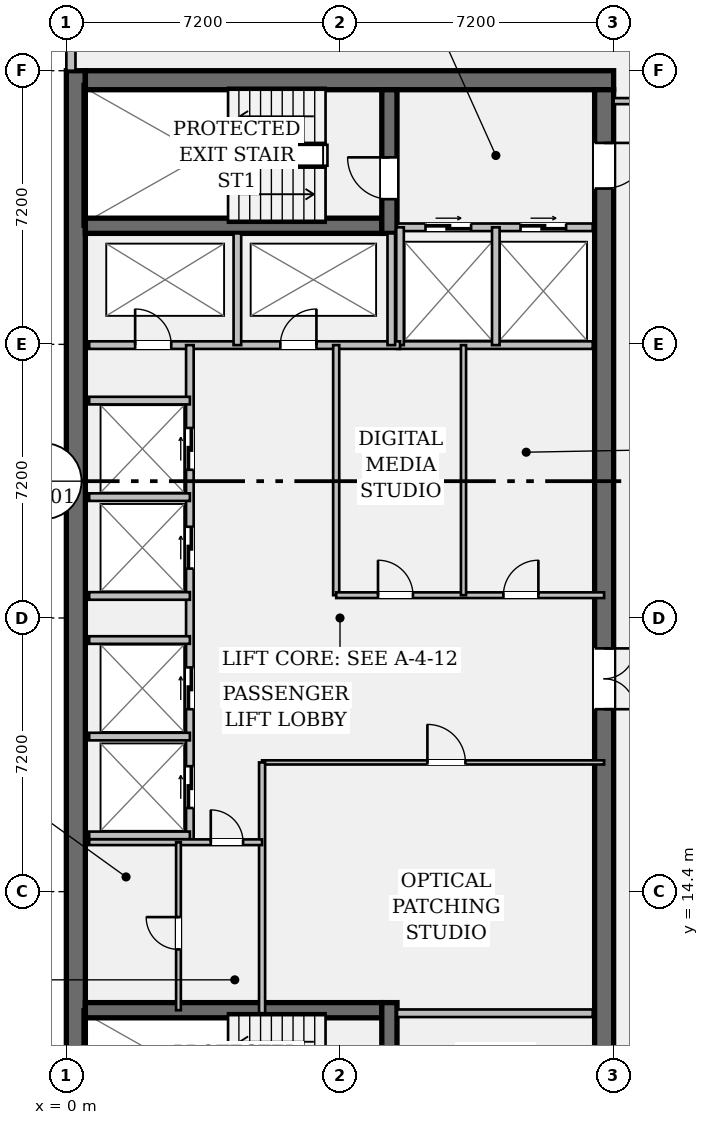
"""IFC4 building model, lengths in metres.
Left out: names, types, materials, properties, quantities, classifications, styles, units other than length and angle.
Written with IfcOpenShell. Run it as: python <this file> out.ifc"""

import sys

from ifc_helpers import new_model, si_unit, direction, frame, frame_2d, origin, place, context, subcontext, project, spatial, rectangle, extrude, element, fill, save


model = new_model("IFC4")
c1 = context("Model", 3, precision=1e-05, world=origin(), true_north=direction((0.0, 1.0)))
c2 = subcontext(c1, "Body", "Model", "MODEL_VIEW")
j1 = project(units=[si_unit("LENGTHUNIT", "METRE"), si_unit("PLANEANGLEUNIT", "RADIAN")], contexts=[c1])
p1 = place(None, origin())
s1 = spatial("IfcSite", under=j1, at=p1, CompositionType="ELEMENT")
p2 = place(p1, origin())
s2 = spatial("IfcBuilding", under=s1, at=p2, CompositionType="ELEMENT")
p3 = place(p2, frame((0.0, 0.0, 229.25)))
s3 = spatial("IfcBuildingStorey", under=s2, at=p3, CompositionType="ELEMENT", Elevation=229.25)
p4 = place(p3, frame((0.25, 7.2, 0.0), z_axis=(0.0, 0.0, 1.0), x_axis=(0.0, 1.0, 0.0)))
e1 = element("IfcWall", 1, at=p4, inside=s3, PredefinedType="SHEAR", context=c2, shape_type="SweptSolid", body=[
    extrude(rectangle(XDim=28.8, YDim=0.5, at=frame_2d((14.4, 0.0))), origin(), (0.0, 0.0, 1.0), 3.24),
])
p5 = place(p3, frame((0.5, 35.75, 0.0), z_axis=(0.0, 0.0, 1.0), x_axis=(1.0, 0.0, 0.0)))
e2 = element("IfcWall", 2, at=p5, inside=s3, PredefinedType="SHEAR", context=c2, shape_type="SweptSolid", body=[
    extrude(rectangle(XDim=13.9, YDim=0.5, at=frame_2d((6.95, 0.0))), origin(), (0.0, 0.0, 1.0), 3.24),
])
p6 = place(p3, frame((14.15, 35.5, 0.0), z_axis=(0.0, 0.0, 1.0), x_axis=(0.0, -1.0, 0.0)))
e3 = element("IfcWall", 3, at=p6, inside=s3, PredefinedType="SHEAR", context=c2, shape_type="SweptSolid", body=[
    extrude(rectangle(XDim=27.8, YDim=0.5, at=frame_2d((13.9, 0.0))), origin(), (0.0, 0.0, 1.0), 3.24),
])
p7 = place(p6, frame((1.4, 0.0, 0.0)))
e4 = element("IfcOpeningElement", 4, at=p7, cuts=e3, PredefinedType="OPENING", context=c2, shape_type="SweptSolid", body=[
    extrude(rectangle(XDim=1.2, YDim=2.15, at=frame_2d((0.6, 1.075))), frame((0.0, 0.262, 0.0), z_axis=(0.0, -1.0, 0.0), x_axis=(1.0, 0.0, 0.0)), (0.0, 0.0, 1.0), 0.524),
])
p8 = place(p6, frame((25.35, 0.0, 0.0)))
e5 = element("IfcOpeningElement", 5, at=p8, cuts=e3, PredefinedType="OPENING", context=c2, shape_type="SweptSolid", body=[
    extrude(rectangle(XDim=1.2, YDim=2.15, at=frame_2d((0.6, 1.075))), frame((0.0, 0.262, 0.0), z_axis=(0.0, -1.0, 0.0), x_axis=(1.0, 0.0, 0.0)), (0.0, 0.0, 1.0), 0.524),
])
p9 = place(p6, frame((14.7, 0.0, 0.0)))
e6 = element("IfcOpeningElement", 6, at=p9, cuts=e3, PredefinedType="OPENING", context=c2, shape_type="SweptSolid", body=[
    extrude(rectangle(XDim=1.6, YDim=2.2, at=frame_2d((0.8, 1.1))), frame((0.0, 0.262, 0.0), z_axis=(0.0, -1.0, 0.0), x_axis=(1.0, 0.0, 0.0)), (0.0, 0.0, 1.0), 0.524),
])
for number, where, z_axis, x_axis in (
    (7, (0.5, 31.92, 0.0), (0.0, 0.0, 1.0), (1.0, 0.0, 0.0)),
    (8, (0.5, 11.28, 0.0), (0.0, 0.0, 1.0), (1.0, 0.0, 0.0)),
):
    element("IfcWall", number, at=place(p3, frame(where, z_axis=z_axis, x_axis=x_axis)), inside=s3, PredefinedType="SHEAR", context=c2, shape_type="SweptSolid", body=[
        extrude(rectangle(XDim=7.8, YDim=0.4, at=frame_2d((3.9, 0.0))), origin(), (0.0, 0.0, 1.0), 3.24),
    ])
p10 = place(p3, frame((8.5, 31.72, 0.0), z_axis=(0.0, 0.0, 1.0), x_axis=(0.0, 1.0, 0.0)))
e9 = element("IfcWall", 9, at=p10, inside=s3, PredefinedType="SHEAR", context=c2, shape_type="SweptSolid", body=[
    extrude(rectangle(XDim=3.78, YDim=0.4, at=frame_2d((1.89, 0.0))), origin(), (0.0, 0.0, 1.0), 3.24),
])
p11 = place(p10, frame((0.9, 0.0, 0.0)))
e10 = element("IfcOpeningElement", 10, at=p11, cuts=e9, PredefinedType="OPENING", context=c2, shape_type="SweptSolid", body=[
    extrude(rectangle(XDim=1.1, YDim=2.15, at=frame_2d((0.55, 1.075))), frame((0.0, 0.212, 0.0), z_axis=(0.0, -1.0, 0.0), x_axis=(1.0, 0.0, 0.0)), (0.0, 0.0, 1.0), 0.424),
])
p12 = place(p3, frame((8.5, 7.7, 0.0), z_axis=(0.0, 0.0, 1.0), x_axis=(0.0, 1.0, 0.0)))
e11 = element("IfcWall", 11, at=p12, inside=s3, PredefinedType="SHEAR", context=c2, shape_type="SweptSolid", body=[
    extrude(rectangle(XDim=3.78, YDim=0.4, at=frame_2d((1.89, 0.0))), origin(), (0.0, 0.0, 1.0), 3.24),
])
p13 = place(p12, frame((0.85, 0.0, 0.0)))
e12 = element("IfcOpeningElement", 12, at=p13, cuts=e11, PredefinedType="OPENING", context=c2, shape_type="SweptSolid", body=[
    extrude(rectangle(XDim=1.1, YDim=2.15, at=frame_2d((0.55, 1.075))), frame((0.0, 0.212, 0.0), z_axis=(0.0, -1.0, 0.0), x_axis=(1.0, 0.0, 0.0)), (0.0, 0.0, 1.0), 0.424),
])
p14 = place(p3, frame((0.12, 36.0, 0.0), z_axis=(0.0, 0.0, 1.0), x_axis=(0.0, 1.0, 0.0)))
e13 = element("IfcWall", 13, at=p14, inside=s3, PredefinedType="STANDARD", context=c2, shape_type="SweptSolid", body=[
    extrude(rectangle(XDim=1.17, YDim=0.24, at=frame_2d((0.585, 0.0))), origin(), (0.0, 0.0, 1.0), 3.24),
])
p15 = place(p3, frame((8.7, 31.88, 0.0), z_axis=(0.0, 0.0, 1.0), x_axis=(1.0, 0.0, 0.0)))
e14 = element("IfcWall", 14, at=p15, inside=s3, PredefinedType="PARTITIONING", context=c2, shape_type="SweptSolid", body=[
    extrude(rectangle(XDim=5.15, YDim=0.2, at=frame_2d((2.575, 0.0))), origin(), (0.0, 0.0, 1.0), 3.24),
])
p16 = place(p15, frame((0.75, 0.0, 0.0)))
e15 = element("IfcOpeningElement", 15, at=p16, cuts=e14, PredefinedType="OPENING", context=c2, shape_type="SweptSolid", body=[
    extrude(rectangle(XDim=1.2, YDim=2.2, at=frame_2d((0.6, 1.1))), frame((0.0, 0.112, 0.0), z_axis=(0.0, -1.0, 0.0), x_axis=(1.0, 0.0, 0.0)), (0.0, 0.0, 1.0), 0.224),
])
p17 = place(p15, frame((3.25, 0.0, 0.0)))
e16 = element("IfcOpeningElement", 16, at=p17, cuts=e14, PredefinedType="OPENING", context=c2, shape_type="SweptSolid", body=[
    extrude(rectangle(XDim=1.2, YDim=2.2, at=frame_2d((0.6, 1.1))), frame((0.0, 0.112, 0.0), z_axis=(0.0, -1.0, 0.0), x_axis=(1.0, 0.0, 0.0)), (0.0, 0.0, 1.0), 0.224),
])
for number, where, z_axis, x_axis in (
    (17, (8.7, 11.2, 0.0), (0.0, 0.0, 1.0), (1.0, 0.0, 0.0)),
    (18, (8.7, 28.78, 0.0), (0.0, 0.0, 1.0), (1.0, 0.0, 0.0)),
):
    element("IfcWall", number, at=place(p3, frame(where, z_axis=z_axis, x_axis=x_axis)), inside=s3, PredefinedType="PARTITIONING", context=c2, shape_type="SweptSolid", body=[
        extrude(rectangle(XDim=5.15, YDim=0.2, at=frame_2d((2.575, 0.0))), origin(), (0.0, 0.0, 1.0), 3.24),
    ])
for number, where, z_axis, x_axis in (
    (19, (8.78, 28.78, 0.0), (0.0, 0.0, 1.0), (0.0, 1.0, 0.0)),
    (20, (11.3, 28.78, 0.0), (0.0, 0.0, 1.0), (0.0, 1.0, 0.0)),
):
    element("IfcWall", number, at=place(p3, frame(where, z_axis=z_axis, x_axis=x_axis)), inside=s3, PredefinedType="PARTITIONING", context=c2, shape_type="SweptSolid", body=[
        extrude(rectangle(XDim=3.1, YDim=0.2, at=frame_2d((1.55, 0.0))), origin(), (0.0, 0.0, 1.0), 3.24),
    ])
p18 = place(p3, frame((0.6, 28.78, 0.0), z_axis=(0.0, 0.0, 1.0), x_axis=(1.0, 0.0, 0.0)))
e21 = element("IfcWall", 21, at=p18, inside=s3, PredefinedType="PARTITIONING", context=c2, shape_type="SweptSolid", body=[
    extrude(rectangle(XDim=8.18, YDim=0.2, at=frame_2d((4.09, 0.0))), origin(), (0.0, 0.0, 1.0), 3.24),
])
p19 = place(p18, frame((1.21, 0.0, 0.0)))
e22 = element("IfcOpeningElement", 22, at=p19, cuts=e21, PredefinedType="OPENING", context=c2, shape_type="SweptSolid", body=[
    extrude(rectangle(XDim=0.95, YDim=2.15, at=frame_2d((0.475, 1.075))), frame((0.0, 0.112, 0.0), z_axis=(0.0, -1.0, 0.0), x_axis=(1.0, 0.0, 0.0)), (0.0, 0.0, 1.0), 0.224),
])
p20 = place(p18, frame((5.03, 0.0, 0.0)))
e23 = element("IfcOpeningElement", 23, at=p20, cuts=e21, PredefinedType="OPENING", context=c2, shape_type="SweptSolid", body=[
    extrude(rectangle(XDim=0.95, YDim=2.15, at=frame_2d((0.475, 1.075))), frame((0.0, 0.112, 0.0), z_axis=(0.0, -1.0, 0.0), x_axis=(1.0, 0.0, 0.0)), (0.0, 0.0, 1.0), 0.224),
])
for number, where, z_axis, x_axis in (
    (24, (4.5, 28.78, 0.0), (0.0, 0.0, 1.0), (0.0, 1.0, 0.0)),
    (25, (8.55, 28.78, 0.0), (0.0, 0.0, 1.0), (0.0, 1.0, 0.0)),
):
    element("IfcWall", number, at=place(p3, frame(where, z_axis=z_axis, x_axis=x_axis)), inside=s3, PredefinedType="PARTITIONING", context=c2, shape_type="SweptSolid", body=[
        extrude(rectangle(XDim=2.94, YDim=0.2, at=frame_2d((1.47, 0.0))), origin(), (0.0, 0.0, 1.0), 3.24),
    ])
p21 = place(p3, frame((3.25, 15.7, 0.0), z_axis=(0.0, 0.0, 1.0), x_axis=(0.0, 1.0, 0.0)))
e26 = element("IfcWall", 26, at=p21, inside=s3, PredefinedType="PARTITIONING", context=c2, shape_type="SweptSolid", body=[
    extrude(rectangle(XDim=13.08, YDim=0.2, at=frame_2d((6.54, 0.0))), origin(), (0.0, 0.0, 1.0), 3.24),
])
p22 = place(p21, frame((0.9, 0.0, 0.0)))
e27 = element("IfcOpeningElement", 27, at=p22, cuts=e26, PredefinedType="OPENING", context=c2, shape_type="SweptSolid", body=[
    extrude(rectangle(XDim=1.1, YDim=2.2, at=frame_2d((0.55, 1.1))), frame((0.0, 0.112, 0.0), z_axis=(0.0, -1.0, 0.0), x_axis=(1.0, 0.0, 0.0)), (0.0, 0.0, 1.0), 0.224),
])
p23 = place(p21, frame((3.5, 0.0, 0.0)))
e28 = element("IfcOpeningElement", 28, at=p23, cuts=e26, PredefinedType="OPENING", context=c2, shape_type="SweptSolid", body=[
    extrude(rectangle(XDim=1.1, YDim=2.2, at=frame_2d((0.55, 1.1))), frame((0.0, 0.112, 0.0), z_axis=(0.0, -1.0, 0.0), x_axis=(1.0, 0.0, 0.0)), (0.0, 0.0, 1.0), 0.224),
])
p24 = place(p21, frame((7.2, 0.0, 0.0)))
e29 = element("IfcOpeningElement", 29, at=p24, cuts=e26, PredefinedType="OPENING", context=c2, shape_type="SweptSolid", body=[
    extrude(rectangle(XDim=1.1, YDim=2.2, at=frame_2d((0.55, 1.1))), frame((0.0, 0.112, 0.0), z_axis=(0.0, -1.0, 0.0), x_axis=(1.0, 0.0, 0.0)), (0.0, 0.0, 1.0), 0.224),
])
p25 = place(p21, frame((9.8, 0.0, 0.0)))
e30 = element("IfcOpeningElement", 30, at=p25, cuts=e26, PredefinedType="OPENING", context=c2, shape_type="SweptSolid", body=[
    extrude(rectangle(XDim=1.1, YDim=2.2, at=frame_2d((0.55, 1.1))), frame((0.0, 0.112, 0.0), z_axis=(0.0, -1.0, 0.0), x_axis=(1.0, 0.0, 0.0)), (0.0, 0.0, 1.0), 0.224),
])
for number, where, z_axis, x_axis in (
    (31, (0.6, 15.88, 0.0), (0.0, 0.0, 1.0), (1.0, 0.0, 0.0)),
    (32, (0.6, 18.48, 0.0), (0.0, 0.0, 1.0), (1.0, 0.0, 0.0)),
    (33, (0.6, 22.18, 0.0), (0.0, 0.0, 1.0), (1.0, 0.0, 0.0)),
    (34, (0.6, 24.78, 0.0), (0.0, 0.0, 1.0), (1.0, 0.0, 0.0)),
    (35, (0.6, 21.02, 0.0), (0.0, 0.0, 1.0), (1.0, 0.0, 0.0)),
    (36, (0.6, 27.32, 0.0), (0.0, 0.0, 1.0), (1.0, 0.0, 0.0)),
):
    element("IfcWall", number, at=place(p3, frame(where, z_axis=z_axis, x_axis=x_axis)), inside=s3, PredefinedType="PARTITIONING", context=c2, shape_type="SweptSolid", body=[
        extrude(rectangle(XDim=2.65, YDim=0.2, at=frame_2d((1.325, 0.0))), origin(), (0.0, 0.0, 1.0), 3.24),
    ])
p26 = place(p3, frame((7.1, 22.2, 0.0), z_axis=(0.0, 0.0, 1.0), x_axis=(0.0, 1.0, 0.0)))
e37 = element("IfcWall", 37, at=p26, inside=s3, PredefinedType="PARTITIONING", context=c2, shape_type="SweptSolid", body=[
    extrude(rectangle(XDim=6.58, YDim=0.16, at=frame_2d((3.29, 0.0))), origin(), (0.0, 0.0, 1.0), 3.24),
])
p27 = place(p3, frame((7.1, 22.2, 0.0), z_axis=(0.0, 0.0, 1.0), x_axis=(1.0, 0.0, 0.0)))
e38 = element("IfcWall", 38, at=p27, inside=s3, PredefinedType="PARTITIONING", context=c2, shape_type="SweptSolid", body=[
    extrude(rectangle(XDim=7.05, YDim=0.15, at=frame_2d((3.525, 0.0))), origin(), (0.0, 0.0, 1.0), 3.24),
])
p28 = place(p27, frame((1.1, 0.0, 0.0)))
e39 = element("IfcOpeningElement", 39, at=p28, cuts=e38, PredefinedType="OPENING", context=c2, shape_type="SweptSolid", body=[
    extrude(rectangle(XDim=0.92, YDim=2.15, at=frame_2d((0.46, 1.075))), frame((0.0, 0.087, 0.0), z_axis=(0.0, -1.0, 0.0), x_axis=(1.0, 0.0, 0.0)), (0.0, 0.0, 1.0), 0.174),
])
p29 = place(p27, frame((4.4, 0.0, 0.0)))
e40 = element("IfcOpeningElement", 40, at=p29, cuts=e38, PredefinedType="OPENING", context=c2, shape_type="SweptSolid", body=[
    extrude(rectangle(XDim=0.92, YDim=2.15, at=frame_2d((0.46, 1.075))), frame((0.0, 0.087, 0.0), z_axis=(0.0, -1.0, 0.0), x_axis=(1.0, 0.0, 0.0)), (0.0, 0.0, 1.0), 0.174),
])
p30 = place(p3, frame((10.45, 22.2, 0.0), z_axis=(0.0, 0.0, 1.0), x_axis=(0.0, 1.0, 0.0)))
e41 = element("IfcWall", 41, at=p30, inside=s3, PredefinedType="PARTITIONING", context=c2, shape_type="SweptSolid", body=[
    extrude(rectangle(XDim=6.58, YDim=0.135, at=frame_2d((3.29, 0.0))), origin(), (0.0, 0.0, 1.0), 3.24),
])
p31 = place(p3, frame((5.15, 17.8, 0.0), z_axis=(0.0, 0.0, 1.0), x_axis=(1.0, 0.0, 0.0)))
e42 = element("IfcWall", 42, at=p31, inside=s3, PredefinedType="PARTITIONING", context=c2, shape_type="SweptSolid", body=[
    extrude(rectangle(XDim=9.0, YDim=0.11, at=frame_2d((4.5, 0.0))), origin(), (0.0, 0.0, 1.0), 3.24),
])
p32 = place(p31, frame((4.35, 0.0, 0.0)))
e43 = element("IfcOpeningElement", 43, at=p32, cuts=e42, PredefinedType="OPENING", context=c2, shape_type="SweptSolid", body=[
    extrude(rectangle(XDim=1.0, YDim=2.15, at=frame_2d((0.5, 1.075))), frame((0.0, 0.067, 0.0), z_axis=(0.0, -1.0, 0.0), x_axis=(1.0, 0.0, 0.0)), (0.0, 0.0, 1.0), 0.134),
])
p33 = place(p3, frame((5.15, 11.2, 0.0), z_axis=(0.0, 0.0, 1.0), x_axis=(0.0, 1.0, 0.0)))
e44 = element("IfcWall", 44, at=p33, inside=s3, PredefinedType="PARTITIONING", context=c2, shape_type="SweptSolid", body=[
    extrude(rectangle(XDim=6.6, YDim=0.16, at=frame_2d((3.3, 0.0))), origin(), (0.0, 0.0, 1.0), 3.24),
])
p34 = place(p3, frame((0.6, 15.7, 0.0), z_axis=(0.0, 0.0, 1.0), x_axis=(1.0, 0.0, 0.0)))
e45 = element("IfcWall", 45, at=p34, inside=s3, PredefinedType="PARTITIONING", context=c2, shape_type="SweptSolid", body=[
    extrude(rectangle(XDim=4.55, YDim=0.15, at=frame_2d((2.275, 0.0))), origin(), (0.0, 0.0, 1.0), 3.24),
])
p35 = place(p34, frame((3.2, 0.0, 0.0)))
e46 = element("IfcOpeningElement", 46, at=p35, cuts=e45, PredefinedType="OPENING", context=c2, shape_type="SweptSolid", body=[
    extrude(rectangle(XDim=0.85, YDim=2.15, at=frame_2d((0.425, 1.075))), frame((0.0, 0.087, 0.0), z_axis=(0.0, -1.0, 0.0), x_axis=(1.0, 0.0, 0.0)), (0.0, 0.0, 1.0), 0.174),
])
p36 = place(p3, frame((2.95, 11.28, 0.0), z_axis=(0.0, 0.0, 1.0), x_axis=(0.0, 1.0, 0.0)))
e47 = element("IfcWall", 47, at=p36, inside=s3, PredefinedType="PARTITIONING", context=c2, shape_type="SweptSolid", body=[
    extrude(rectangle(XDim=4.42, YDim=0.125, at=frame_2d((2.21, 0.0))), origin(), (0.0, 0.0, 1.0), 3.24),
])
p37 = place(p36, frame((1.6, 0.0, 0.0)))
e48 = element("IfcOpeningElement", 48, at=p37, cuts=e47, PredefinedType="OPENING", context=c2, shape_type="SweptSolid", body=[
    extrude(rectangle(XDim=0.85, YDim=2.15, at=frame_2d((0.425, 1.075))), frame((0.0, 0.074, 0.0), z_axis=(0.0, -1.0, 0.0), x_axis=(1.0, 0.0, 0.0)), (0.0, 0.0, 1.0), 0.149),
])
p38 = place(p3, frame((14.4, 35.2, 0.0), z_axis=(0.0, 0.0, 1.0), x_axis=(1.0, 0.0, 0.0)))
e49 = element("IfcWall", 49, at=p38, inside=s3, PredefinedType="PARTITIONING", context=c2, shape_type="SweptSolid", body=[
    extrude(rectangle(XDim=2.95, YDim=0.16, at=frame_2d((1.475, 0.0))), origin(), (0.0, 0.0, 1.0), 2.808),
])
p39 = place(p38, frame((0.95, 0.0, 0.0)))
e50 = element("IfcOpeningElement", 50, at=p39, cuts=e49, PredefinedType="OPENING", context=c2, shape_type="SweptSolid", body=[
    extrude(rectangle(XDim=1.0, YDim=2.15, at=frame_2d((0.5, 1.075))), frame((0.0, 0.092, 0.0), z_axis=(0.0, -1.0, 0.0), x_axis=(1.0, 0.0, 0.0)), (0.0, 0.0, 1.0), 0.184),
])
p40 = place(p11, origin())
e51 = element("IfcDoor", 51, at=p40, inside=s3, OperationType="SINGLE_SWING_RIGHT", PredefinedType="DOOR", context=c2, shape_type="SweptSolid", body=[
    extrude(rectangle(XDim=1.1, YDim=2.15, at=frame_2d((0.55, 1.075))), frame((0.0, 0.025, 0.0), z_axis=(0.0, -1.0, 0.0), x_axis=(1.0, 0.0, 0.0)), (0.0, 0.0, 1.0), 0.05),
])
fill(e10, e51)
p41 = place(p7, origin())
e52 = element("IfcDoor", 52, at=p41, inside=s3, OperationType="SINGLE_SWING_LEFT", PredefinedType="DOOR", context=c2, shape_type="SweptSolid", body=[
    extrude(rectangle(XDim=1.2, YDim=2.15, at=frame_2d((0.6, 1.075))), frame((0.0, 0.025, 0.0), z_axis=(0.0, -1.0, 0.0), x_axis=(1.0, 0.0, 0.0)), (0.0, 0.0, 1.0), 0.05),
])
fill(e4, e52)
p42 = place(p16, origin())
e53 = element("IfcDoor", 53, at=p42, inside=s3, OperationType="DOUBLE_DOOR_SLIDING", PredefinedType="DOOR", context=c2, shape_type="SweptSolid", body=[
    extrude(rectangle(XDim=1.2, YDim=2.2, at=frame_2d((0.6, 1.1))), frame((0.0, 0.025, 0.0), z_axis=(0.0, -1.0, 0.0), x_axis=(1.0, 0.0, 0.0)), (0.0, 0.0, 1.0), 0.05),
])
fill(e15, e53)
p43 = place(p17, origin())
e54 = element("IfcDoor", 54, at=p43, inside=s3, OperationType="DOUBLE_DOOR_SLIDING", PredefinedType="DOOR", context=c2, shape_type="SweptSolid", body=[
    extrude(rectangle(XDim=1.2, YDim=2.2, at=frame_2d((0.6, 1.1))), frame((0.0, 0.025, 0.0), z_axis=(0.0, -1.0, 0.0), x_axis=(1.0, 0.0, 0.0)), (0.0, 0.0, 1.0), 0.05),
])
fill(e16, e54)
p44 = place(p19, origin())
e55 = element("IfcDoor", 55, at=p44, inside=s3, OperationType="SINGLE_SWING_LEFT", PredefinedType="DOOR", context=c2, shape_type="SweptSolid", body=[
    extrude(rectangle(XDim=0.95, YDim=2.15, at=frame_2d((0.475, 1.075))), frame((0.0, 0.025, 0.0), z_axis=(0.0, -1.0, 0.0), x_axis=(1.0, 0.0, 0.0)), (0.0, 0.0, 1.0), 0.05),
])
fill(e22, e55)
p45 = place(p20, origin())
e56 = element("IfcDoor", 56, at=p45, inside=s3, OperationType="SINGLE_SWING_RIGHT", PredefinedType="DOOR", context=c2, shape_type="SweptSolid", body=[
    extrude(rectangle(XDim=0.95, YDim=2.15, at=frame_2d((0.475, 1.075))), frame((0.0, 0.025, 0.0), z_axis=(0.0, -1.0, 0.0), x_axis=(1.0, 0.0, 0.0)), (0.0, 0.0, 1.0), 0.05),
])
fill(e23, e56)
p46 = place(p9, origin())
e57 = element("IfcDoor", 57, at=p46, inside=s3, OperationType="DOUBLE_DOOR_SINGLE_SWING", PredefinedType="DOOR", context=c2, shape_type="SweptSolid", body=[
    extrude(rectangle(XDim=1.6, YDim=2.2, at=frame_2d((0.8, 1.1))), frame((0.0, 0.025, 0.0), z_axis=(0.0, -1.0, 0.0), x_axis=(1.0, 0.0, 0.0)), (0.0, 0.0, 1.0), 0.05),
])
fill(e6, e57)
p47 = place(p22, origin())
e58 = element("IfcDoor", 58, at=p47, inside=s3, OperationType="DOUBLE_DOOR_SLIDING", PredefinedType="DOOR", context=c2, shape_type="SweptSolid", body=[
    extrude(rectangle(XDim=1.1, YDim=2.2, at=frame_2d((0.55, 1.1))), frame((0.0, 0.025, 0.0), z_axis=(0.0, -1.0, 0.0), x_axis=(1.0, 0.0, 0.0)), (0.0, 0.0, 1.0), 0.05),
])
fill(e27, e58)
p48 = place(p23, origin())
e59 = element("IfcDoor", 59, at=p48, inside=s3, OperationType="DOUBLE_DOOR_SLIDING", PredefinedType="DOOR", context=c2, shape_type="SweptSolid", body=[
    extrude(rectangle(XDim=1.1, YDim=2.2, at=frame_2d((0.55, 1.1))), frame((0.0, 0.025, 0.0), z_axis=(0.0, -1.0, 0.0), x_axis=(1.0, 0.0, 0.0)), (0.0, 0.0, 1.0), 0.05),
])
fill(e28, e59)
p49 = place(p24, origin())
e60 = element("IfcDoor", 60, at=p49, inside=s3, OperationType="DOUBLE_DOOR_SLIDING", PredefinedType="DOOR", context=c2, shape_type="SweptSolid", body=[
    extrude(rectangle(XDim=1.1, YDim=2.2, at=frame_2d((0.55, 1.1))), frame((0.0, 0.025, 0.0), z_axis=(0.0, -1.0, 0.0), x_axis=(1.0, 0.0, 0.0)), (0.0, 0.0, 1.0), 0.05),
])
fill(e29, e60)
p50 = place(p25, origin())
e61 = element("IfcDoor", 61, at=p50, inside=s3, OperationType="DOUBLE_DOOR_SLIDING", PredefinedType="DOOR", context=c2, shape_type="SweptSolid", body=[
    extrude(rectangle(XDim=1.1, YDim=2.2, at=frame_2d((0.55, 1.1))), frame((0.0, 0.025, 0.0), z_axis=(0.0, -1.0, 0.0), x_axis=(1.0, 0.0, 0.0)), (0.0, 0.0, 1.0), 0.05),
])
fill(e30, e61)
p51 = place(p28, origin())
e62 = element("IfcDoor", 62, at=p51, inside=s3, OperationType="SINGLE_SWING_LEFT", PredefinedType="DOOR", context=c2, shape_type="SweptSolid", body=[
    extrude(rectangle(XDim=0.92, YDim=2.15, at=frame_2d((0.46, 1.075))), frame((0.0, 0.025, 0.0), z_axis=(0.0, -1.0, 0.0), x_axis=(1.0, 0.0, 0.0)), (0.0, 0.0, 1.0), 0.05),
])
fill(e39, e62)
p52 = place(p29, origin())
e63 = element("IfcDoor", 63, at=p52, inside=s3, OperationType="SINGLE_SWING_RIGHT", PredefinedType="DOOR", context=c2, shape_type="SweptSolid", body=[
    extrude(rectangle(XDim=0.92, YDim=2.15, at=frame_2d((0.46, 1.075))), frame((0.0, 0.025, 0.0), z_axis=(0.0, -1.0, 0.0), x_axis=(1.0, 0.0, 0.0)), (0.0, 0.0, 1.0), 0.05),
])
fill(e40, e63)
p53 = place(p32, origin())
e64 = element("IfcDoor", 64, at=p53, inside=s3, OperationType="SINGLE_SWING_LEFT", PredefinedType="DOOR", context=c2, shape_type="SweptSolid", body=[
    extrude(rectangle(XDim=1.0, YDim=2.15, at=frame_2d((0.5, 1.075))), frame((0.0, 0.025, 0.0), z_axis=(0.0, -1.0, 0.0), x_axis=(1.0, 0.0, 0.0)), (0.0, 0.0, 1.0), 0.05),
])
fill(e43, e64)
p54 = place(p35, origin())
e65 = element("IfcDoor", 65, at=p54, inside=s3, OperationType="SINGLE_SWING_LEFT", PredefinedType="DOOR", context=c2, shape_type="SweptSolid", body=[
    extrude(rectangle(XDim=0.85, YDim=2.15, at=frame_2d((0.425, 1.075))), frame((0.0, 0.025, 0.0), z_axis=(0.0, -1.0, 0.0), x_axis=(1.0, 0.0, 0.0)), (0.0, 0.0, 1.0), 0.05),
])
fill(e46, e65)
p55 = place(p37, origin())
e66 = element("IfcDoor", 66, at=p55, inside=s3, OperationType="SINGLE_SWING_RIGHT", PredefinedType="DOOR", context=c2, shape_type="SweptSolid", body=[
    extrude(rectangle(XDim=0.85, YDim=2.15, at=frame_2d((0.425, 1.075))), frame((0.0, 0.025, 0.0), z_axis=(0.0, -1.0, 0.0), x_axis=(1.0, 0.0, 0.0)), (0.0, 0.0, 1.0), 0.05),
])
fill(e48, e66)
save(model, sys.argv[1])
